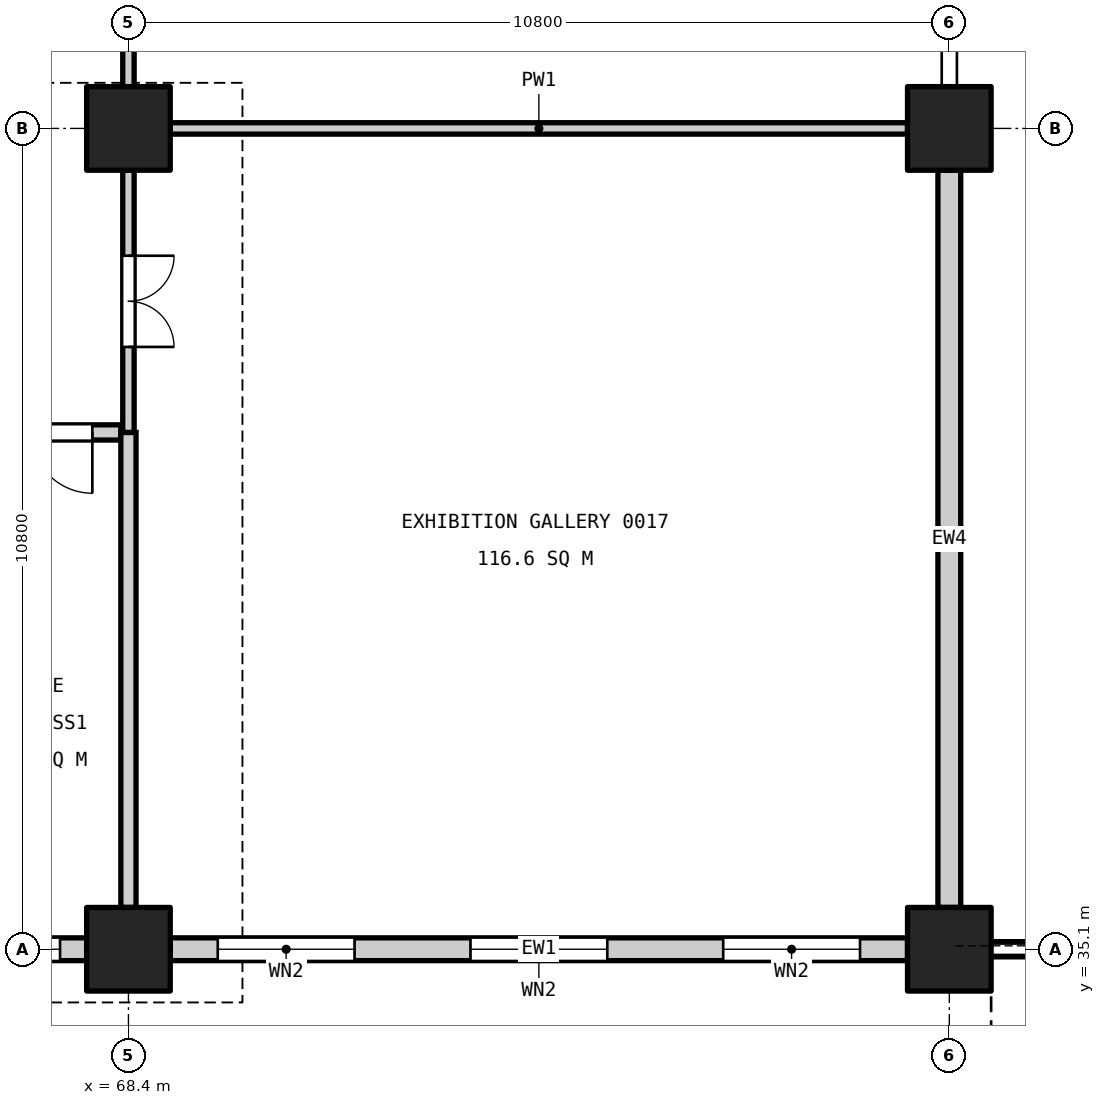
"""IFC4 building model, lengths in metres.
Left out: names, types, materials, properties, quantities, classifications, styles, units other than length and angle.
Written with IfcOpenShell. Run it as: python <this file> out.ifc"""

import sys

from ifc_helpers import new_model, si_unit, direction, frame, frame_2d, origin, origin_2d, place, context, subcontext, project, spatial, rectangle, extrude, element, fill, save


model = new_model("IFC4")
c1 = context("Model", 3, precision=1e-05, world=origin(), true_north=direction((0.0, 1.0)))
c2 = subcontext(c1, "Body", "Model", "MODEL_VIEW")
j1 = project(units=[si_unit("LENGTHUNIT", "METRE"), si_unit("PLANEANGLEUNIT", "RADIAN")], contexts=[c1])
p1 = place(None, origin())
s1 = spatial("IfcSite", under=j1, at=p1, CompositionType="ELEMENT")
p2 = place(p1, origin())
s2 = spatial("IfcBuilding", under=s1, at=p2, CompositionType="ELEMENT")
p3 = place(p2, origin())
s3 = spatial("IfcBuildingStorey", under=s2, at=p3, CompositionType="ELEMENT", Elevation=0.0)
for number, where, z_axis, x_axis in (
    (1, (68.4, 35.1, 0.0), (0.0, 0.0, 1.0), (1.0, 0.0, 0.0)),
    (2, (68.4, 45.9, 0.0), (0.0, 0.0, 1.0), (1.0, 0.0, 0.0)),
    (3, (79.2, 35.1, 0.0), (0.0, 0.0, 1.0), (1.0, 0.0, 0.0)),
    (4, (79.2, 45.9, 0.0), (0.0, 0.0, 1.0), (1.0, 0.0, 0.0)),
):
    element("IfcColumn", number, at=place(p3, frame(where, z_axis=z_axis, x_axis=x_axis)), inside=s3, PredefinedType="COLUMN", context=c2, shape_type="SweptSolid", body=[
        extrude(rectangle(XDim=1.1, YDim=1.1, at=origin_2d()), origin(), (0.0, 0.0, 1.0), 6.0),
    ])
p4 = place(p3, frame((79.75, 35.1, 0.0), z_axis=(0.0, 0.0, 1.0), x_axis=(1.0, 0.0, 0.0)))
e5 = element("IfcWall", 5, at=p4, inside=s3, PredefinedType="SOLIDWALL", context=c2, shape_type="SweptSolid", body=[
    extrude(rectangle(XDim=20.5, YDim=0.2, at=frame_2d((10.25, 0.0))), origin(), (0.0, 0.0, 1.0), 2.6),
])
p5 = place(p4, frame((0.608, 0.0, 0.0)))
e6 = element("IfcOpeningElement", 6, at=p5, cuts=e5, PredefinedType="OPENING", context=c2, shape_type="SweptSolid", body=[
    extrude(rectangle(XDim=2.2, YDim=2.4, at=frame_2d((1.1, 1.2))), frame((0.0, 0.11, 0.0), z_axis=(0.0, -1.0, 0.0), x_axis=(1.0, 0.0, 0.0)), (0.0, 0.0, 1.0), 0.22),
])
p6 = place(p4, frame((4.025, 0.0, 0.0)))
e7 = element("IfcOpeningElement", 7, at=p6, cuts=e5, PredefinedType="OPENING", context=c2, shape_type="SweptSolid", body=[
    extrude(rectangle(XDim=2.2, YDim=2.4, at=frame_2d((1.1, 1.2))), frame((0.0, 0.11, 0.0), z_axis=(0.0, -1.0, 0.0), x_axis=(1.0, 0.0, 0.0)), (0.0, 0.0, 1.0), 0.22),
])
p7 = place(p4, frame((7.442, 0.0, 0.0)))
e8 = element("IfcOpeningElement", 8, at=p7, cuts=e5, PredefinedType="OPENING", context=c2, shape_type="SweptSolid", body=[
    extrude(rectangle(XDim=2.2, YDim=2.4, at=frame_2d((1.1, 1.2))), frame((0.0, 0.11, 0.0), z_axis=(0.0, -1.0, 0.0), x_axis=(1.0, 0.0, 0.0)), (0.0, 0.0, 1.0), 0.22),
])
p8 = place(p4, frame((10.858, 0.0, 0.0)))
e9 = element("IfcOpeningElement", 9, at=p8, cuts=e5, PredefinedType="OPENING", context=c2, shape_type="SweptSolid", body=[
    extrude(rectangle(XDim=2.2, YDim=2.4, at=frame_2d((1.1, 1.2))), frame((0.0, 0.11, 0.0), z_axis=(0.0, -1.0, 0.0), x_axis=(1.0, 0.0, 0.0)), (0.0, 0.0, 1.0), 0.22),
])
p9 = place(p4, frame((14.275, 0.0, 0.0)))
e10 = element("IfcOpeningElement", 10, at=p9, cuts=e5, PredefinedType="OPENING", context=c2, shape_type="SweptSolid", body=[
    extrude(rectangle(XDim=2.2, YDim=2.4, at=frame_2d((1.1, 1.2))), frame((0.0, 0.11, 0.0), z_axis=(0.0, -1.0, 0.0), x_axis=(1.0, 0.0, 0.0)), (0.0, 0.0, 1.0), 0.22),
])
p10 = place(p4, frame((17.692, 0.0, 0.0)))
e11 = element("IfcOpeningElement", 11, at=p10, cuts=e5, PredefinedType="OPENING", context=c2, shape_type="SweptSolid", body=[
    extrude(rectangle(XDim=2.2, YDim=2.4, at=frame_2d((1.1, 1.2))), frame((0.0, 0.11, 0.0), z_axis=(0.0, -1.0, 0.0), x_axis=(1.0, 0.0, 0.0)), (0.0, 0.0, 1.0), 0.22),
])
p11 = place(p3, frame((65.95, 35.1, 0.0), z_axis=(0.0, 0.0, 1.0), x_axis=(1.0, 0.0, 0.0)))
e12 = element("IfcWall", 12, at=p11, inside=s3, PredefinedType="STANDARD", context=c2, shape_type="SweptSolid", body=[
    extrude(rectangle(XDim=1.9, YDim=0.3, at=frame_2d((0.95, 0.0))), origin(), (0.0, 0.0, 1.0), 4.9),
])
p12 = place(p11, frame((0.35, 0.0, 0.9)))
e13 = element("IfcOpeningElement", 13, at=p12, cuts=e12, PredefinedType="OPENING", context=c2, shape_type="SweptSolid", body=[
    extrude(rectangle(XDim=1.2, YDim=2.4, at=frame_2d((0.6, 1.2))), frame((0.0, 0.16, 0.0), z_axis=(0.0, -1.0, 0.0), x_axis=(1.0, 0.0, 0.0)), (0.0, 0.0, 1.0), 0.32),
])
p13 = place(p3, frame((68.95, 35.1, 0.0), z_axis=(0.0, 0.0, 1.0), x_axis=(1.0, 0.0, 0.0)))
e14 = element("IfcWall", 14, at=p13, inside=s3, PredefinedType="STANDARD", context=c2, shape_type="SweptSolid", body=[
    extrude(rectangle(XDim=9.7, YDim=0.3, at=frame_2d((4.85, 0.0))), origin(), (0.0, 0.0, 1.0), 4.9),
])
p14 = place(p13, frame((0.625, 0.0, 0.9)))
e15 = element("IfcOpeningElement", 15, at=p14, cuts=e14, PredefinedType="OPENING", context=c2, shape_type="SweptSolid", body=[
    extrude(rectangle(XDim=1.8, YDim=3.0, at=frame_2d((0.9, 1.5))), frame((0.0, 0.16, 0.0), z_axis=(0.0, -1.0, 0.0), x_axis=(1.0, 0.0, 0.0)), (0.0, 0.0, 1.0), 0.32),
])
p15 = place(p13, frame((3.95, 0.0, 0.9)))
e16 = element("IfcOpeningElement", 16, at=p15, cuts=e14, PredefinedType="OPENING", context=c2, shape_type="SweptSolid", body=[
    extrude(rectangle(XDim=1.8, YDim=3.0, at=frame_2d((0.9, 1.5))), frame((0.0, 0.16, 0.0), z_axis=(0.0, -1.0, 0.0), x_axis=(1.0, 0.0, 0.0)), (0.0, 0.0, 1.0), 0.32),
])
p16 = place(p13, frame((7.275, 0.0, 0.9)))
e17 = element("IfcOpeningElement", 17, at=p16, cuts=e14, PredefinedType="OPENING", context=c2, shape_type="SweptSolid", body=[
    extrude(rectangle(XDim=1.8, YDim=3.0, at=frame_2d((0.9, 1.5))), frame((0.0, 0.16, 0.0), z_axis=(0.0, -1.0, 0.0), x_axis=(1.0, 0.0, 0.0)), (0.0, 0.0, 1.0), 0.32),
])
p17 = place(p3, frame((79.2, 35.65, 0.0), z_axis=(0.0, 0.0, 1.0), x_axis=(0.0, 1.0, 0.0)))
e18 = element("IfcWall", 18, at=p17, inside=s3, PredefinedType="STANDARD", context=c2, shape_type="SweptSolid", body=[
    extrude(rectangle(XDim=9.7, YDim=0.3, at=frame_2d((4.85, 0.0))), origin(), (0.0, 0.0, 1.0), 4.6),
])
p18 = place(p3, frame((65.95, 41.9, 0.0), z_axis=(0.0, 0.0, 1.0), x_axis=(1.0, 0.0, 0.0)))
e19 = element("IfcWall", 19, at=p18, inside=s3, PredefinedType="PARTITIONING", context=c2, shape_type="SweptSolid", body=[
    extrude(rectangle(XDim=2.35, YDim=0.2, at=frame_2d((1.175, 0.0))), origin(), (0.0, 0.0, 1.0), 4.6),
])
p19 = place(p18, frame((0.375, 0.0, 0.0)))
e20 = element("IfcOpeningElement", 20, at=p19, cuts=e19, PredefinedType="OPENING", context=c2, shape_type="SweptSolid", body=[
    extrude(rectangle(XDim=1.6, YDim=2.1, at=frame_2d((0.8, 1.05))), frame((0.0, 0.11, 0.0), z_axis=(0.0, -1.0, 0.0), x_axis=(1.0, 0.0, 0.0)), (0.0, 0.0, 1.0), 0.22),
])
p20 = place(p3, frame((68.4, 35.65, 0.0), z_axis=(0.0, 0.0, 1.0), x_axis=(0.0, 1.0, 0.0)))
e21 = element("IfcWall", 21, at=p20, inside=s3, PredefinedType="PARTITIONING", context=c2, shape_type="SweptSolid", body=[
    extrude(rectangle(XDim=6.25, YDim=0.2, at=frame_2d((3.125, 0.0))), origin(), (0.0, 0.0, 1.0), 4.6),
])
p21 = place(p3, frame((68.4, 41.9, 0.0), z_axis=(0.0, 0.0, 1.0), x_axis=(0.0, 1.0, 0.0)))
e22 = element("IfcWall", 22, at=p21, inside=s3, PredefinedType="PARTITIONING", context=c2, shape_type="SweptSolid", body=[
    extrude(rectangle(XDim=3.45, YDim=0.15, at=frame_2d((1.725, 0.0))), origin(), (0.0, 0.0, 1.0), 4.6),
])
p22 = place(p21, frame((1.125, 0.0, 0.0)))
e23 = element("IfcOpeningElement", 23, at=p22, cuts=e22, PredefinedType="OPENING", context=c2, shape_type="SweptSolid", body=[
    extrude(rectangle(XDim=1.2, YDim=2.1, at=frame_2d((0.6, 1.05))), frame((0.0, 0.085, 0.0), z_axis=(0.0, -1.0, 0.0), x_axis=(1.0, 0.0, 0.0)), (0.0, 0.0, 1.0), 0.17),
])
p23 = place(p3, frame((68.4, 46.45, 0.0), z_axis=(0.0, 0.0, 1.0), x_axis=(0.0, 1.0, 0.0)))
e24 = element("IfcWall", 24, at=p23, inside=s3, PredefinedType="PARTITIONING", context=c2, shape_type="SweptSolid", body=[
    extrude(rectangle(XDim=9.7, YDim=0.15, at=frame_2d((4.85, 0.0))), origin(), (0.0, 0.0, 1.0), 4.6),
])
p24 = place(p23, frame((4.25, 0.0, 0.0)))
e25 = element("IfcOpeningElement", 25, at=p24, cuts=e24, PredefinedType="OPENING", context=c2, shape_type="SweptSolid", body=[
    extrude(rectangle(XDim=1.2, YDim=2.1, at=frame_2d((0.6, 1.05))), frame((0.0, 0.085, 0.0), z_axis=(0.0, -1.0, 0.0), x_axis=(1.0, 0.0, 0.0)), (0.0, 0.0, 1.0), 0.17),
])
p25 = place(p3, frame((68.95, 45.9, 0.0), z_axis=(0.0, 0.0, 1.0), x_axis=(1.0, 0.0, 0.0)))
e26 = element("IfcWall", 26, at=p25, inside=s3, PredefinedType="PARTITIONING", context=c2, shape_type="SweptSolid", body=[
    extrude(rectangle(XDim=9.7, YDim=0.15, at=frame_2d((4.85, 0.0))), origin(), (0.0, 0.0, 1.0), 4.9),
])
p26 = place(p12, origin())
e27 = element("IfcWindow", 27, at=p26, inside=s3, PartitioningType="SINGLE_PANEL", PredefinedType="WINDOW", context=c2, shape_type="SweptSolid", body=[
    extrude(rectangle(XDim=1.2, YDim=2.4, at=frame_2d((0.6, 1.2))), frame((0.0, 0.03, 0.0), z_axis=(0.0, -1.0, 0.0), x_axis=(1.0, 0.0, 0.0)), (0.0, 0.0, 1.0), 0.06),
])
fill(e13, e27)
p27 = place(p14, origin())
e28 = element("IfcWindow", 28, at=p27, inside=s3, PartitioningType="SINGLE_PANEL", PredefinedType="WINDOW", context=c2, shape_type="SweptSolid", body=[
    extrude(rectangle(XDim=1.8, YDim=3.0, at=frame_2d((0.9, 1.5))), frame((0.0, 0.03, 0.0), z_axis=(0.0, -1.0, 0.0), x_axis=(1.0, 0.0, 0.0)), (0.0, 0.0, 1.0), 0.06),
])
fill(e15, e28)
p28 = place(p15, origin())
e29 = element("IfcWindow", 29, at=p28, inside=s3, PartitioningType="SINGLE_PANEL", PredefinedType="WINDOW", context=c2, shape_type="SweptSolid", body=[
    extrude(rectangle(XDim=1.8, YDim=3.0, at=frame_2d((0.9, 1.5))), frame((0.0, 0.03, 0.0), z_axis=(0.0, -1.0, 0.0), x_axis=(1.0, 0.0, 0.0)), (0.0, 0.0, 1.0), 0.06),
])
fill(e16, e29)
p29 = place(p16, origin())
e30 = element("IfcWindow", 30, at=p29, inside=s3, PartitioningType="SINGLE_PANEL", PredefinedType="WINDOW", context=c2, shape_type="SweptSolid", body=[
    extrude(rectangle(XDim=1.8, YDim=3.0, at=frame_2d((0.9, 1.5))), frame((0.0, 0.03, 0.0), z_axis=(0.0, -1.0, 0.0), x_axis=(1.0, 0.0, 0.0)), (0.0, 0.0, 1.0), 0.06),
])
fill(e17, e30)
p30 = place(p22, frame((1.2, 0.0, 0.0), z_axis=(0.0, 0.0, 1.0), x_axis=(-1.0, 0.0, 0.0)))
e31 = element("IfcDoor", 31, at=p30, inside=s3, OperationType="DOUBLE_DOOR_SINGLE_SWING", PredefinedType="DOOR", context=c2, shape_type="SweptSolid", body=[
    extrude(rectangle(XDim=1.2, YDim=2.1, at=frame_2d((0.6, 1.05))), frame((0.0, 0.025, 0.0), z_axis=(0.0, -1.0, 0.0), x_axis=(1.0, 0.0, 0.0)), (0.0, 0.0, 1.0), 0.05),
])
fill(e23, e31)
p31 = place(p19, frame((1.6, 0.0, 0.0), z_axis=(0.0, 0.0, 1.0), x_axis=(-1.0, 0.0, 0.0)))
e32 = element("IfcDoor", 32, at=p31, inside=s3, OperationType="DOUBLE_DOOR_SINGLE_SWING", PredefinedType="DOOR", context=c2, shape_type="SweptSolid", body=[
    extrude(rectangle(XDim=1.6, YDim=2.1, at=frame_2d((0.8, 1.05))), frame((0.0, 0.025, 0.0), z_axis=(0.0, -1.0, 0.0), x_axis=(1.0, 0.0, 0.0)), (0.0, 0.0, 1.0), 0.05),
])
fill(e20, e32)
save(model, sys.argv[1])
